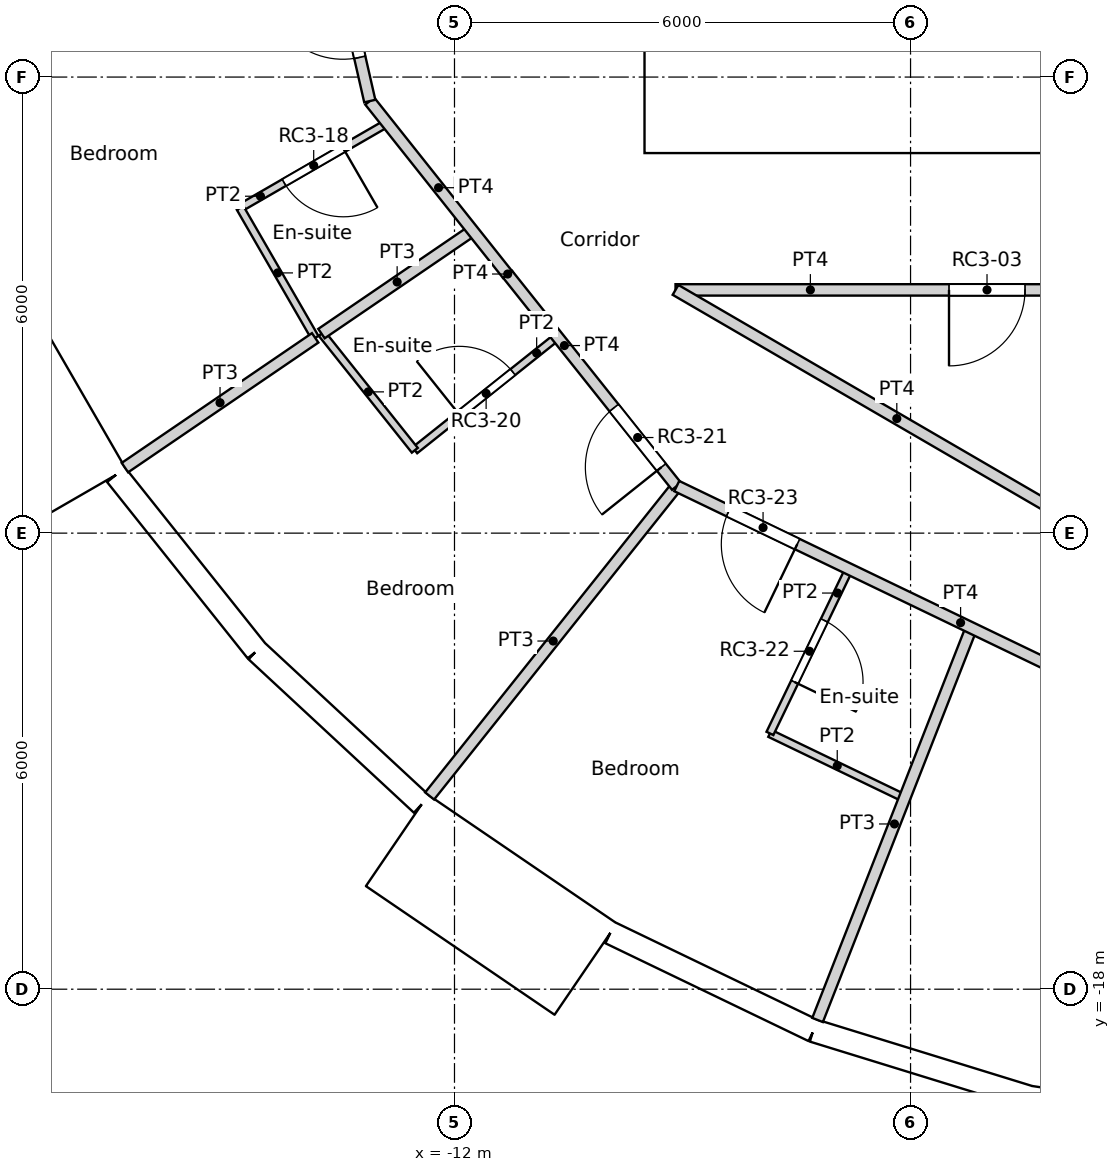
"""IFC4 building model, lengths in metres.
Left out: names, types, materials, properties, quantities, classifications, styles, units other than length and angle.
Written with IfcOpenShell. Run it as: python <this file> out.ifc"""

import sys

from ifc_helpers import new_model, si_unit, direction, frame, frame_2d, origin, origin_2d, place, context, subcontext, project, spatial, rectangle, circle, extrude, element, fill, save


model = new_model("IFC4")
c1 = context("Model", 3, precision=1e-05, world=origin(), true_north=direction((0.0, 1.0)))
c2 = subcontext(c1, "Body", "Model", "MODEL_VIEW")
j1 = project(units=[si_unit("LENGTHUNIT", "METRE"), si_unit("PLANEANGLEUNIT", "RADIAN")], contexts=[c1])
p1 = place(None, origin())
s1 = spatial("IfcSite", under=j1, at=p1, CompositionType="ELEMENT")
p2 = place(p1, origin())
s2 = spatial("IfcBuilding", under=s1, at=p2, CompositionType="ELEMENT")
p3 = place(p2, frame((0.0, 0.0, 252.6)))
s3 = spatial("IfcBuildingStorey", under=s2, at=p3, CompositionType="ELEMENT", Elevation=252.6)
for number, where, z_axis, x_axis in (
    (1, (-16.958, -8.167, 0.0), (0.0, 0.0, 1.0), (1.0, 0.0, 0.0)),
    (2, (-13.798, -12.802, 0.0), (0.0, 0.0, 1.0), (1.0, 0.0, 0.0)),
    (3, (-9.411, -16.301, 0.0), (0.0, 0.0, 1.0), (1.0, 0.0, 0.0)),
    (4, (-4.188, -18.35, 0.0), (0.0, 0.0, 1.0), (1.0, 0.0, 0.0)),
):
    element("IfcColumn", number, at=place(p3, frame(where, z_axis=z_axis, x_axis=x_axis)), inside=s3, PredefinedType="COLUMN", context=c2, shape_type="SweptSolid", body=[
        extrude(circle(Radius=0.55, at=origin_2d()), origin(), (0.0, 0.0, 1.0), 3.6),
    ])
p4 = place(p3, frame((-18.452, -8.921, -0.35), z_axis=(0.0, 0.0, 1.0), x_axis=(0.499990139034, -0.866031096941, 0.0)))
e5 = element("IfcWall", 5, at=p4, inside=s3, PredefinedType="ELEMENTEDWALL", context=c2, shape_type="SweptSolid", body=[
    extrude(rectangle(XDim=3.0, YDim=1.45, at=frame_2d((1.5, 0.0))), origin(), (0.0, 0.0, 1.0), 3.6),
])
p5 = place(p4, frame((1.5, 0.0, 1.9)))
e6 = element("IfcOpeningElement", 6, at=p5, cuts=e5, PredefinedType="OPENING", context=c2, shape_type="SweptSolid", body=[
    extrude(circle(Radius=0.9, at=origin_2d()), frame((0.0, 0.735, 0.0), z_axis=(0.0, -1.0, 0.0), x_axis=(1.0, 0.0, 0.0)), (0.0, 0.0, 1.0), 1.47),
])
p6 = place(p3, frame((-16.451, -11.234, 0.0), z_axis=(0.0, 0.0, 1.0), x_axis=(0.623498236992, -0.781824755599, 0.0)))
e7 = element("IfcWall", 7, at=p6, inside=s3, PredefinedType="SOLIDWALL", context=c2, shape_type="SweptSolid", body=[
    extrude(rectangle(XDim=2.962, YDim=0.3, at=frame_2d((1.481, 0.0))), origin(), (0.0, 0.0, 1.0), 3.25),
])
p7 = place(p6, frame((1.481, 0.0, 1.55)))
e8 = element("IfcOpeningElement", 8, at=p7, cuts=e7, PredefinedType="OPENING", context=c2, shape_type="SweptSolid", body=[
    extrude(circle(Radius=0.9, at=origin_2d()), frame((0.0, 0.16, 0.0), z_axis=(0.0, -1.0, 0.0), x_axis=(1.0, 0.0, 0.0)), (0.0, 0.0, 1.0), 0.32),
])
p8 = place(p3, frame((-14.604, -13.55, 0.0), z_axis=(0.0, 0.0, 1.0), x_axis=(0.733066412643, -0.680157066165, 0.0)))
e9 = element("IfcWall", 9, at=p8, inside=s3, PredefinedType="SOLIDWALL", context=c2, shape_type="SweptSolid", body=[
    extrude(rectangle(XDim=2.962, YDim=0.3, at=frame_2d((1.481, 0.0))), origin(), (0.0, 0.0, 1.0), 3.25),
])
p9 = place(p8, frame((1.481, 0.0, 1.55)))
e10 = element("IfcOpeningElement", 10, at=p9, cuts=e9, PredefinedType="OPENING", context=c2, shape_type="SweptSolid", body=[
    extrude(circle(Radius=0.9, at=origin_2d()), frame((0.0, 0.16, 0.0), z_axis=(0.0, -1.0, 0.0), x_axis=(1.0, 0.0, 0.0)), (0.0, 0.0, 1.0), 0.32),
])
p10 = place(p3, frame((-12.754, -16.044, -0.35), z_axis=(0.0, 0.0, 1.0), x_axis=(0.826246281157, -0.563309047392, 0.0)))
e11 = element("IfcWall", 11, at=p10, inside=s3, PredefinedType="ELEMENTEDWALL", context=c2, shape_type="SweptSolid", body=[
    extrude(rectangle(XDim=3.0, YDim=1.45, at=frame_2d((1.5, 0.0))), origin(), (0.0, 0.0, 1.0), 3.6),
])
p11 = place(p10, frame((1.5, 0.0, 1.9)))
e12 = element("IfcOpeningElement", 12, at=p11, cuts=e11, PredefinedType="OPENING", context=c2, shape_type="SweptSolid", body=[
    extrude(circle(Radius=0.9, at=origin_2d()), frame((0.0, 0.735, 0.0), z_axis=(0.0, -1.0, 0.0), x_axis=(1.0, 0.0, 0.0)), (0.0, 0.0, 1.0), 1.47),
])
p12 = place(p3, frame((-9.947, -17.259, 0.0), z_axis=(0.0, 0.0, 1.0), x_axis=(0.900939615635, -0.433944476838, 0.0)))
e13 = element("IfcWall", 13, at=p12, inside=s3, PredefinedType="SOLIDWALL", context=c2, shape_type="SweptSolid", body=[
    extrude(rectangle(XDim=2.962, YDim=0.3, at=frame_2d((1.481, 0.0))), origin(), (0.0, 0.0, 1.0), 3.25),
])
p13 = place(p12, frame((1.481, 0.0, 1.55)))
e14 = element("IfcOpeningElement", 14, at=p13, cuts=e13, PredefinedType="OPENING", context=c2, shape_type="SweptSolid", body=[
    extrude(circle(Radius=0.9, at=origin_2d()), frame((0.0, 0.16, 0.0), z_axis=(0.0, -1.0, 0.0), x_axis=(1.0, 0.0, 0.0)), (0.0, 0.0, 1.0), 0.32),
])
p14 = place(p3, frame((-7.278, -18.545, 0.0), z_axis=(0.0, 0.0, 1.0), x_axis=(0.95558635705, -0.294711238707, 0.0)))
e15 = element("IfcWall", 15, at=p14, inside=s3, PredefinedType="SOLIDWALL", context=c2, shape_type="SweptSolid", body=[
    extrude(rectangle(XDim=2.962, YDim=0.3, at=frame_2d((1.481, 0.0))), origin(), (0.0, 0.0, 1.0), 3.25),
])
p15 = place(p14, frame((1.481, 0.0, 1.55)))
e16 = element("IfcOpeningElement", 16, at=p15, cuts=e15, PredefinedType="OPENING", context=c2, shape_type="SweptSolid", body=[
    extrude(circle(Radius=0.9, at=origin_2d()), frame((0.0, 0.16, 0.0), z_axis=(0.0, -1.0, 0.0), x_axis=(1.0, 0.0, 0.0)), (0.0, 0.0, 1.0), 0.32),
])
p16 = place(p3, frame((-4.53, -19.989, -0.35), z_axis=(0.0, 0.0, 1.0), x_axis=(0.988836445254, -0.149004981587, 0.0)))
e17 = element("IfcWall", 17, at=p16, inside=s3, PredefinedType="ELEMENTEDWALL", context=c2, shape_type="SweptSolid", body=[
    extrude(rectangle(XDim=3.0, YDim=1.45, at=frame_2d((1.5, 0.0))), origin(), (0.0, 0.0, 1.0), 3.6),
])
p17 = place(p16, frame((1.5, 0.0, 1.9)))
e18 = element("IfcOpeningElement", 18, at=p17, cuts=e17, PredefinedType="OPENING", context=c2, shape_type="SweptSolid", body=[
    extrude(circle(Radius=0.9, at=origin_2d()), frame((0.0, 0.735, 0.0), z_axis=(0.0, -1.0, 0.0), x_axis=(1.0, 0.0, 0.0)), (0.0, 0.0, 1.0), 1.47),
])
p18 = place(p3, frame((-9.5, -6.7, 0.0), z_axis=(0.0, 0.0, 1.0), x_axis=(1.0, 0.0, 0.0)))
e19 = element("IfcWall", 19, at=p18, inside=s3, PredefinedType="SOLIDWALL", context=c2, shape_type="SweptSolid", body=[
    extrude(rectangle(XDim=19.0, YDim=0.6, at=frame_2d((9.5, 0.0))), origin(), (0.0, 0.0, 1.0), 3.6),
])
p19 = place(p18, frame((10.4, 0.0, 0.0)))
e20 = element("IfcOpeningElement", 20, at=p19, cuts=e19, PredefinedType="OPENING", context=c2, shape_type="SweptSolid", body=[
    extrude(rectangle(XDim=1.0, YDim=2.1, at=frame_2d((0.5, 1.05))), frame((0.0, 0.3, 0.0), z_axis=(0.0, -1.0, 0.0), x_axis=(1.0, 0.0, 0.0)), (0.0, 0.0, 1.0), 0.6),
])
p20 = place(p18, frame((5.35, 0.0, 0.0)))
e21 = element("IfcOpeningElement", 21, at=p20, cuts=e19, PredefinedType="OPENING", context=c2, shape_type="SweptSolid", body=[
    extrude(rectangle(XDim=1.7, YDim=2.1, at=frame_2d((0.85, 1.05))), frame((0.0, 0.3, 0.0), z_axis=(0.0, -1.0, 0.0), x_axis=(1.0, 0.0, 0.0)), (0.0, 0.0, 1.0), 0.6),
])
p21 = place(p18, frame((11.95, 0.0, 0.0)))
e22 = element("IfcOpeningElement", 22, at=p21, cuts=e19, PredefinedType="OPENING", context=c2, shape_type="SweptSolid", body=[
    extrude(rectangle(XDim=1.7, YDim=2.1, at=frame_2d((0.85, 1.05))), frame((0.0, 0.3, 0.0), z_axis=(0.0, -1.0, 0.0), x_axis=(1.0, 0.0, 0.0)), (0.0, 0.0, 1.0), 0.6),
])
p22 = place(p3, frame((-9.2, -6.4, 0.0), z_axis=(0.0, 0.0, 1.0), x_axis=(0.0, 1.0, 0.0)))
e23 = element("IfcWall", 23, at=p22, inside=s3, PredefinedType="SOLIDWALL", context=c2, shape_type="SweptSolid", body=[
    extrude(rectangle(XDim=12.8, YDim=0.6, at=frame_2d((6.4, 0.0))), origin(), (0.0, 0.0, 1.0), 3.6),
])
p23 = place(p3, frame((-9.092, -8.8, 0.0), z_axis=(0.0, 0.0, 1.0), x_axis=(1.0, 0.0, 0.0)))
e24 = element("IfcWall", 24, at=p23, inside=s3, PredefinedType="PARTITIONING", context=c2, shape_type="SweptSolid", body=[
    extrude(rectangle(XDim=8.196, YDim=0.15, at=frame_2d((4.098, 0.0))), origin(), (0.0, 0.0, 1.0), 3.25),
])
p24 = place(p23, frame((3.598, 0.0, 0.0)))
e25 = element("IfcOpeningElement", 25, at=p24, cuts=e24, PredefinedType="OPENING", context=c2, shape_type="SweptSolid", body=[
    extrude(rectangle(XDim=1.0, YDim=2.04, at=frame_2d((0.5, 1.02))), frame((0.0, 0.075, 0.0), z_axis=(0.0, -1.0, 0.0), x_axis=(1.0, 0.0, 0.0)), (0.0, 0.0, 1.0), 0.15),
])
p25 = place(p3, frame((-9.092, -8.8, 0.0), z_axis=(0.0, 0.0, 1.0), x_axis=(0.864470922103, -0.502682827277, 0.0)))
e26 = element("IfcWall", 26, at=p25, inside=s3, PredefinedType="PARTITIONING", context=c2, shape_type="SweptSolid", body=[
    extrude(rectangle(XDim=6.735, YDim=0.15, at=frame_2d((3.368, 0.0))), origin(), (0.0, 0.0, 1.0), 3.25),
])
p26 = place(p3, frame((-11.3, -8.596, 0.0), z_axis=(0.0, 0.0, 1.0), x_axis=(0.623165080354, -0.782090328944, 0.0)))
e27 = element("IfcWall", 27, at=p26, inside=s3, PredefinedType="PARTITIONING", context=c2, shape_type="SweptSolid", body=[
    extrude(rectangle(XDim=3.564, YDim=0.15, at=frame_2d((1.782, 0.0))), origin(), (0.0, 0.0, 1.0), 3.25),
])
p27 = place(p26, frame((2.244, 0.0, 0.0)))
e28 = element("IfcOpeningElement", 28, at=p27, cuts=e27, PredefinedType="OPENING", context=c2, shape_type="SweptSolid", body=[
    extrude(rectangle(XDim=1.0, YDim=2.1, at=frame_2d((0.5, 1.05))), frame((0.0, 0.075, 0.0), z_axis=(0.0, -1.0, 0.0), x_axis=(1.0, 0.0, 0.0)), (0.0, 0.0, 1.0), 0.15),
])
p28 = place(p3, frame((-11.3, -8.596, 0.0), z_axis=(0.0, 0.0, 1.0), x_axis=(0.0, 1.0, 0.0)))
e29 = element("IfcWall", 29, at=p28, inside=s3, PredefinedType="PARTITIONING", context=c2, shape_type="SweptSolid", body=[
    extrude(rectangle(XDim=0.01, YDim=0.15, at=frame_2d((0.005, 0.0))), origin(), (0.0, 0.0, 1.0), 3.25),
])
p29 = place(p3, frame((-14.557, 0.0, 0.0), z_axis=(0.0, 0.0, 1.0), x_axis=(0.22264061368, -0.974900588337, 0.0)))
e30 = element("IfcWall", 30, at=p29, inside=s3, PredefinedType="PARTITIONING", context=c2, shape_type="SweptSolid", body=[
    extrude(rectangle(XDim=6.479, YDim=0.15, at=frame_2d((3.239, 0.0))), origin(), (0.0, 0.0, 1.0), 3.25),
])
p30 = place(p29, frame((4.888, 0.0, 0.0)))
e31 = element("IfcOpeningElement", 31, at=p30, cuts=e30, PredefinedType="OPENING", context=c2, shape_type="SweptSolid", body=[
    extrude(rectangle(XDim=1.0, YDim=2.1, at=frame_2d((0.5, 1.05))), frame((0.0, 0.075, 0.0), z_axis=(0.0, -1.0, 0.0), x_axis=(1.0, 0.0, 0.0)), (0.0, 0.0, 1.0), 0.15),
])
p31 = place(p3, frame((-13.115, -6.316, 0.0), z_axis=(0.0, 0.0, 1.0), x_axis=(0.622042479172, -0.782983495423, 0.0)))
e32 = element("IfcWall", 32, at=p31, inside=s3, PredefinedType="PARTITIONING", context=c2, shape_type="SweptSolid", body=[
    extrude(rectangle(XDim=2.911, YDim=0.15, at=frame_2d((1.456, 0.0))), origin(), (0.0, 0.0, 1.0), 3.25),
])
p32 = place(p3, frame((-9.076, -11.381, 0.0), z_axis=(0.0, 0.0, 1.0), x_axis=(0.901070942113, -0.433671716024, 0.0)))
e33 = element("IfcWall", 33, at=p32, inside=s3, PredefinedType="PARTITIONING", context=c2, shape_type="SweptSolid", body=[
    extrude(rectangle(XDim=6.479, YDim=0.15, at=frame_2d((3.239, 0.0))), origin(), (0.0, 0.0, 1.0), 3.25),
])
p33 = place(p32, frame((0.76, 0.0, 0.0)))
e34 = element("IfcOpeningElement", 34, at=p33, cuts=e33, PredefinedType="OPENING", context=c2, shape_type="SweptSolid", body=[
    extrude(rectangle(XDim=1.0, YDim=2.1, at=frame_2d((0.5, 1.05))), frame((0.0, 0.075, 0.0), z_axis=(0.0, -1.0, 0.0), x_axis=(1.0, 0.0, 0.0)), (0.0, 0.0, 1.0), 0.15),
])
p34 = place(p3, frame((-18.893, -5.828, 0.0), z_axis=(0.0, 0.0, 1.0), x_axis=(0.955580602693, 0.294729896274, 0.0)))
e35 = element("IfcWall", 35, at=p34, inside=s3, PredefinedType="PARTITIONING", context=c2, shape_type="SweptSolid", body=[
    extrude(rectangle(XDim=5.54, YDim=0.15, at=frame_2d((2.77, 0.0))), origin(), (0.0, 0.0, 1.0), 3.25),
])
p35 = place(p3, frame((-14.82, -7.722, 0.0), z_axis=(0.0, 0.0, 1.0), x_axis=(0.866076416361, 0.499911633214, 0.0)))
e36 = element("IfcWall", 36, at=p35, inside=s3, PredefinedType="PARTITIONING", context=c2, shape_type="SweptSolid", body=[
    extrude(rectangle(XDim=2.234, YDim=0.1, at=frame_2d((1.117, 0.0))), origin(), (0.0, 0.0, 1.0), 3.25),
])
p36 = place(p35, frame((0.667, 0.0, 0.0)))
e37 = element("IfcOpeningElement", 37, at=p36, cuts=e36, PredefinedType="OPENING", context=c2, shape_type="SweptSolid", body=[
    extrude(rectangle(XDim=0.9, YDim=2.04, at=frame_2d((0.45, 1.02))), frame((0.0, 0.05, 0.0), z_axis=(0.0, -1.0, 0.0), x_axis=(1.0, 0.0, 0.0)), (0.0, 0.0, 1.0), 0.1),
])
p37 = place(p3, frame((-14.82, -7.722, 0.0), z_axis=(0.0, 0.0, 1.0), x_axis=(0.500143626598, -0.865942465048, 0.0)))
e38 = element("IfcWall", 38, at=p37, inside=s3, PredefinedType="PARTITIONING", context=c2, shape_type="SweptSolid", body=[
    extrude(rectangle(XDim=1.974, YDim=0.1, at=frame_2d((0.987, 0.0))), origin(), (0.0, 0.0, 1.0), 3.25),
])
p38 = place(p3, frame((-16.336, -11.138, 0.0), z_axis=(0.0, 0.0, 1.0), x_axis=(0.826152320289, 0.56344684193, 0.0)))
e39 = element("IfcWall", 39, at=p38, inside=s3, PredefinedType="PARTITIONING", context=c2, shape_type="SweptSolid", body=[
    extrude(rectangle(XDim=3.03, YDim=0.15, at=frame_2d((1.515, 0.0))), origin(), (0.0, 0.0, 1.0), 3.25),
])
p39 = place(p3, frame((-13.75, -9.375, 0.0), z_axis=(0.0, 0.0, 1.0), x_axis=(0.826143746222, 0.563459413426, 0.0)))
e40 = element("IfcWall", 40, at=p39, inside=s3, PredefinedType="PARTITIONING", context=c2, shape_type="SweptSolid", body=[
    extrude(rectangle(XDim=2.41, YDim=0.15, at=frame_2d((1.205, 0.0))), origin(), (0.0, 0.0, 1.0), 3.25),
])
p40 = place(p3, frame((-13.747, -9.373, 0.0), z_axis=(0.0, 0.0, 1.0), x_axis=(0.623330716607, -0.781958322249, 0.0)))
e41 = element("IfcWall", 41, at=p40, inside=s3, PredefinedType="PARTITIONING", context=c2, shape_type="SweptSolid", body=[
    extrude(rectangle(XDim=1.965, YDim=0.1, at=frame_2d((0.983, 0.0))), origin(), (0.0, 0.0, 1.0), 3.25),
])
p41 = place(p3, frame((-12.522, -10.91, 0.0), z_axis=(0.0, 0.0, 1.0), x_axis=(0.781830263661, 0.623491330191, 0.0)))
e42 = element("IfcWall", 42, at=p41, inside=s3, PredefinedType="PARTITIONING", context=c2, shape_type="SweptSolid", body=[
    extrude(rectangle(XDim=2.401, YDim=0.1, at=frame_2d((1.2, 0.0))), origin(), (0.0, 0.0, 1.0), 3.25),
])
p42 = place(p41, frame((0.75, 0.0, 0.0)))
e43 = element("IfcOpeningElement", 43, at=p42, cuts=e42, PredefinedType="OPENING", context=c2, shape_type="SweptSolid", body=[
    extrude(rectangle(XDim=0.9, YDim=2.04, at=frame_2d((0.45, 1.02))), frame((0.0, 0.05, 0.0), z_axis=(0.0, -1.0, 0.0), x_axis=(1.0, 0.0, 0.0)), (0.0, 0.0, 1.0), 0.1),
])
p43 = place(p3, frame((-12.327, -15.458, 0.0), z_axis=(0.0, 0.0, 1.0), x_axis=(0.623460949534, 0.781854490558, 0.0)))
e44 = element("IfcWall", 44, at=p43, inside=s3, PredefinedType="PARTITIONING", context=c2, shape_type="SweptSolid", body=[
    extrude(rectangle(XDim=5.214, YDim=0.15, at=frame_2d((2.607, 0.0))), origin(), (0.0, 0.0, 1.0), 3.25),
])
p44 = place(p3, frame((-7.85, -14.635, 0.0), z_axis=(0.0, 0.0, 1.0), x_axis=(0.433815618773, 0.901001669759, 0.0)))
e45 = element("IfcWall", 45, at=p44, inside=s3, PredefinedType="PARTITIONING", context=c2, shape_type="SweptSolid", body=[
    extrude(rectangle(XDim=2.4, YDim=0.1, at=frame_2d((1.2, 0.0))), origin(), (0.0, 0.0, 1.0), 3.25),
])
p45 = place(p44, frame((0.75, 0.0, 0.0)))
e46 = element("IfcOpeningElement", 46, at=p45, cuts=e45, PredefinedType="OPENING", context=c2, shape_type="SweptSolid", body=[
    extrude(rectangle(XDim=0.9, YDim=2.04, at=frame_2d((0.45, 1.02))), frame((0.0, 0.05, 0.0), z_axis=(0.0, -1.0, 0.0), x_axis=(1.0, 0.0, 0.0)), (0.0, 0.0, 1.0), 0.1),
])
p46 = place(p3, frame((-7.85, -14.635, 0.0), z_axis=(0.0, 0.0, 1.0), x_axis=(0.900936932599, -0.433950047216, 0.0)))
e47 = element("IfcWall", 47, at=p46, inside=s3, PredefinedType="PARTITIONING", context=c2, shape_type="SweptSolid", body=[
    extrude(rectangle(XDim=1.966, YDim=0.1, at=frame_2d((0.983, 0.0))), origin(), (0.0, 0.0, 1.0), 3.25),
])
p47 = place(p3, frame((-7.223, -18.405, 0.0), z_axis=(0.0, 0.0, 1.0), x_axis=(0.36511374114, 0.930962918719, 0.0)))
e48 = element("IfcWall", 48, at=p47, inside=s3, PredefinedType="PARTITIONING", context=c2, shape_type="SweptSolid", body=[
    extrude(rectangle(XDim=5.54, YDim=0.15, at=frame_2d((2.77, 0.0))), origin(), (0.0, 0.0, 1.0), 3.25),
])
p48 = place(p5, origin())
e49 = element("IfcWindow", 49, at=p48, inside=s3, PartitioningType="SINGLE_PANEL", PredefinedType="WINDOW", context=c2, shape_type="SweptSolid", body=[
    extrude(circle(Radius=0.9, at=origin_2d()), frame((0.0, 0.695, 0.0), z_axis=(0.0, -1.0, 0.0), x_axis=(1.0, 0.0, 0.0)), (0.0, 0.0, 1.0), 0.1),
])
fill(e6, e49)
p49 = place(p7, origin())
e50 = element("IfcWindow", 50, at=p49, inside=s3, PartitioningType="SINGLE_PANEL", PredefinedType="WINDOW", context=c2, shape_type="SweptSolid", body=[
    extrude(circle(Radius=0.9, at=origin_2d()), frame((0.0, 0.12, 0.0), z_axis=(0.0, -1.0, 0.0), x_axis=(1.0, 0.0, 0.0)), (0.0, 0.0, 1.0), 0.1),
])
fill(e8, e50)
p50 = place(p9, origin())
e51 = element("IfcWindow", 51, at=p50, inside=s3, PartitioningType="SINGLE_PANEL", PredefinedType="WINDOW", context=c2, shape_type="SweptSolid", body=[
    extrude(circle(Radius=0.9, at=origin_2d()), frame((0.0, 0.12, 0.0), z_axis=(0.0, -1.0, 0.0), x_axis=(1.0, 0.0, 0.0)), (0.0, 0.0, 1.0), 0.1),
])
fill(e10, e51)
p51 = place(p11, origin())
e52 = element("IfcWindow", 52, at=p51, inside=s3, PartitioningType="SINGLE_PANEL", PredefinedType="WINDOW", context=c2, shape_type="SweptSolid", body=[
    extrude(circle(Radius=0.9, at=origin_2d()), frame((0.0, 0.695, 0.0), z_axis=(0.0, -1.0, 0.0), x_axis=(1.0, 0.0, 0.0)), (0.0, 0.0, 1.0), 0.1),
])
fill(e12, e52)
p52 = place(p13, origin())
e53 = element("IfcWindow", 53, at=p52, inside=s3, PartitioningType="SINGLE_PANEL", PredefinedType="WINDOW", context=c2, shape_type="SweptSolid", body=[
    extrude(circle(Radius=0.9, at=origin_2d()), frame((0.0, 0.12, 0.0), z_axis=(0.0, -1.0, 0.0), x_axis=(1.0, 0.0, 0.0)), (0.0, 0.0, 1.0), 0.1),
])
fill(e14, e53)
p53 = place(p15, origin())
e54 = element("IfcWindow", 54, at=p53, inside=s3, PartitioningType="SINGLE_PANEL", PredefinedType="WINDOW", context=c2, shape_type="SweptSolid", body=[
    extrude(circle(Radius=0.9, at=origin_2d()), frame((0.0, 0.12, 0.0), z_axis=(0.0, -1.0, 0.0), x_axis=(1.0, 0.0, 0.0)), (0.0, 0.0, 1.0), 0.1),
])
fill(e16, e54)
p54 = place(p24, origin())
e55 = element("IfcDoor", 55, at=p54, inside=s3, OperationType="SINGLE_SWING_RIGHT", PredefinedType="DOOR", context=c2, shape_type="SweptSolid", body=[
    extrude(rectangle(XDim=1.0, YDim=2.04, at=frame_2d((0.5, 1.02))), frame((0.0, 0.025, 0.0), z_axis=(0.0, -1.0, 0.0), x_axis=(1.0, 0.0, 0.0)), (0.0, 0.0, 1.0), 0.05),
])
fill(e25, e55)
p55 = place(p36, origin())
e56 = element("IfcDoor", 56, at=p55, inside=s3, OperationType="SINGLE_SWING_LEFT", PredefinedType="DOOR", context=c2, shape_type="SweptSolid", body=[
    extrude(rectangle(XDim=0.9, YDim=2.04, at=frame_2d((0.45, 1.02))), frame((0.0, 0.025, 0.0), z_axis=(0.0, -1.0, 0.0), x_axis=(1.0, 0.0, 0.0)), (0.0, 0.0, 1.0), 0.05),
])
fill(e37, e56)
p56 = place(p30, origin())
e57 = element("IfcDoor", 57, at=p56, inside=s3, OperationType="SINGLE_SWING_RIGHT", PredefinedType="DOOR", context=c2, shape_type="SweptSolid", body=[
    extrude(rectangle(XDim=1.0, YDim=2.1, at=frame_2d((0.5, 1.05))), frame((0.0, 0.025, 0.0), z_axis=(0.0, -1.0, 0.0), x_axis=(1.0, 0.0, 0.0)), (0.0, 0.0, 1.0), 0.05),
])
fill(e31, e57)
p57 = place(p42, origin())
e58 = element("IfcDoor", 58, at=p57, inside=s3, OperationType="SINGLE_SWING_LEFT", PredefinedType="DOOR", context=c2, shape_type="SweptSolid", body=[
    extrude(rectangle(XDim=0.9, YDim=2.04, at=frame_2d((0.45, 1.02))), frame((0.0, 0.025, 0.0), z_axis=(0.0, -1.0, 0.0), x_axis=(1.0, 0.0, 0.0)), (0.0, 0.0, 1.0), 0.05),
])
fill(e43, e58)
p58 = place(p27, origin())
e59 = element("IfcDoor", 59, at=p58, inside=s3, OperationType="SINGLE_SWING_LEFT", PredefinedType="DOOR", context=c2, shape_type="SweptSolid", body=[
    extrude(rectangle(XDim=1.0, YDim=2.1, at=frame_2d((0.5, 1.05))), frame((0.0, 0.025, 0.0), z_axis=(0.0, -1.0, 0.0), x_axis=(1.0, 0.0, 0.0)), (0.0, 0.0, 1.0), 0.05),
])
fill(e28, e59)
p59 = place(p45, origin())
e60 = element("IfcDoor", 60, at=p59, inside=s3, OperationType="SINGLE_SWING_RIGHT", PredefinedType="DOOR", context=c2, shape_type="SweptSolid", body=[
    extrude(rectangle(XDim=0.9, YDim=2.04, at=frame_2d((0.45, 1.02))), frame((0.0, 0.025, 0.0), z_axis=(0.0, -1.0, 0.0), x_axis=(1.0, 0.0, 0.0)), (0.0, 0.0, 1.0), 0.05),
])
fill(e46, e60)
p60 = place(p33, origin())
e61 = element("IfcDoor", 61, at=p60, inside=s3, OperationType="SINGLE_SWING_LEFT", PredefinedType="DOOR", context=c2, shape_type="SweptSolid", body=[
    extrude(rectangle(XDim=1.0, YDim=2.1, at=frame_2d((0.5, 1.05))), frame((0.0, 0.025, 0.0), z_axis=(0.0, -1.0, 0.0), x_axis=(1.0, 0.0, 0.0)), (0.0, 0.0, 1.0), 0.05),
])
fill(e34, e61)
save(model, sys.argv[1])
